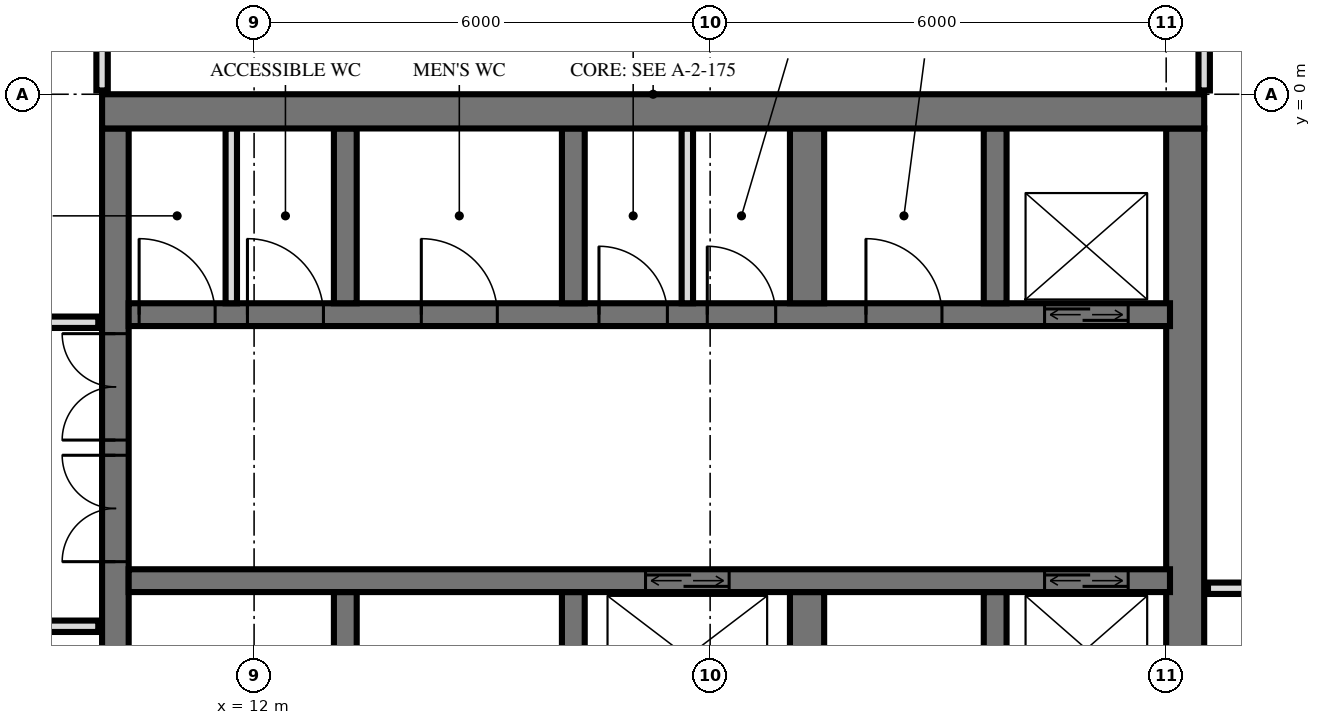
"""IFC4 building model, lengths in metres.
Left out: names, types, materials, properties, quantities, classifications, styles, units other than length and angle.
Written with IfcOpenShell. Run it as: python <this file> out.ifc"""

import sys

from ifc_helpers import new_model, si_unit, direction, frame, frame_2d, origin, place, context, subcontext, project, spatial, rectangle, extrude, element, fill, save


model = new_model("IFC4")
c1 = context("Model", 3, precision=1e-05, world=origin(), true_north=direction((0.0, 1.0)))
c2 = subcontext(c1, "Body", "Model", "MODEL_VIEW")
j1 = project(units=[si_unit("LENGTHUNIT", "METRE"), si_unit("PLANEANGLEUNIT", "RADIAN")], contexts=[c1])
p1 = place(None, origin())
s1 = spatial("IfcSite", under=j1, at=p1, CompositionType="ELEMENT")
p2 = place(p1, origin())
s2 = spatial("IfcBuilding", under=s1, at=p2, CompositionType="ELEMENT")
p3 = place(p2, frame((0.0, 0.0, 156.0)))
s3 = spatial("IfcBuildingStorey", under=s2, at=p3, CompositionType="ELEMENT", Elevation=156.0)
p4 = place(p3, frame((10.0, -0.225, 0.0), z_axis=(0.0, 0.0, 1.0), x_axis=(1.0, 0.0, 0.0)))
e1 = element("IfcWall", 1, at=p4, inside=s3, PredefinedType="SHEAR", context=c2, shape_type="SweptSolid", body=[
    extrude(rectangle(XDim=14.5, YDim=0.45, at=frame_2d((7.25, 0.0))), origin(), (0.0, 0.0, 1.0), 3.6),
])
p5 = place(p3, frame((10.175, -14.55, 0.0), z_axis=(0.0, 0.0, 1.0), x_axis=(0.0, 1.0, 0.0)))
e2 = element("IfcWall", 2, at=p5, inside=s3, PredefinedType="SHEAR", context=c2, shape_type="SweptSolid", body=[
    extrude(rectangle(XDim=14.1, YDim=0.35, at=frame_2d((7.05, 0.0))), origin(), (0.0, 0.0, 1.0), 3.6),
])
p6 = place(p5, frame((8.4, 0.0, 0.0)))
e3 = element("IfcOpeningElement", 3, at=p6, cuts=e2, PredefinedType="OPENING", context=c2, shape_type="SweptSolid", body=[
    extrude(rectangle(XDim=1.4, YDim=2.4, at=frame_2d((0.7, 1.2))), frame((0.0, 0.185, 0.0), z_axis=(0.0, -1.0, 0.0), x_axis=(1.0, 0.0, 0.0)), (0.0, 0.0, 1.0), 0.37),
])
p7 = place(p5, frame((10.0, 0.0, 0.0)))
e4 = element("IfcOpeningElement", 4, at=p7, cuts=e2, PredefinedType="OPENING", context=c2, shape_type="SweptSolid", body=[
    extrude(rectangle(XDim=1.4, YDim=2.4, at=frame_2d((0.7, 1.2))), frame((0.0, 0.185, 0.0), z_axis=(0.0, -1.0, 0.0), x_axis=(1.0, 0.0, 0.0)), (0.0, 0.0, 1.0), 0.37),
])
p8 = place(p5, frame((4.0, 0.0, 0.0)))
e5 = element("IfcOpeningElement", 5, at=p8, cuts=e2, PredefinedType="OPENING", context=c2, shape_type="SweptSolid", body=[
    extrude(rectangle(XDim=1.2, YDim=2.1, at=frame_2d((0.6, 1.05))), frame((0.0, 0.185, 0.0), z_axis=(0.0, -1.0, 0.0), x_axis=(1.0, 0.0, 0.0)), (0.0, 0.0, 1.0), 0.37),
])
p9 = place(p3, frame((24.25, -14.55, 0.0), z_axis=(0.0, 0.0, 1.0), x_axis=(0.0, 1.0, 0.0)))
e6 = element("IfcWall", 6, at=p9, inside=s3, PredefinedType="SHEAR", context=c2, shape_type="SweptSolid", body=[
    extrude(rectangle(XDim=14.1, YDim=0.5, at=frame_2d((7.05, 0.0))), origin(), (0.0, 0.0, 1.0), 3.6),
])
p10 = place(p3, frame((10.35, -2.9, 0.0), z_axis=(0.0, 0.0, 1.0), x_axis=(1.0, 0.0, 0.0)))
e7 = element("IfcWall", 7, at=p10, inside=s3, PredefinedType="SHEAR", context=c2, shape_type="SweptSolid", body=[
    extrude(rectangle(XDim=13.7, YDim=0.3, at=frame_2d((6.85, 0.0))), origin(), (0.0, 0.0, 1.0), 3.6),
])
p11 = place(p10, frame((12.05, 0.0, 0.0)))
e8 = element("IfcOpeningElement", 8, at=p11, cuts=e7, PredefinedType="OPENING", context=c2, shape_type="SweptSolid", body=[
    extrude(rectangle(XDim=1.1, YDim=2.1, at=frame_2d((0.55, 1.05))), frame((0.0, 0.16, 0.0), z_axis=(0.0, -1.0, 0.0), x_axis=(1.0, 0.0, 0.0)), (0.0, 0.0, 1.0), 0.32),
])
p12 = place(p10, frame((6.188, 0.0, 0.0)))
e9 = element("IfcOpeningElement", 9, at=p12, cuts=e7, PredefinedType="OPENING", context=c2, shape_type="SweptSolid", body=[
    extrude(rectangle(XDim=0.9, YDim=2.1, at=frame_2d((0.45, 1.05))), frame((0.0, 0.16, 0.0), z_axis=(0.0, -1.0, 0.0), x_axis=(1.0, 0.0, 0.0)), (0.0, 0.0, 1.0), 0.32),
])
p13 = place(p10, frame((7.613, 0.0, 0.0)))
e10 = element("IfcOpeningElement", 10, at=p13, cuts=e7, PredefinedType="OPENING", context=c2, shape_type="SweptSolid", body=[
    extrude(rectangle(XDim=0.9, YDim=2.1, at=frame_2d((0.45, 1.05))), frame((0.0, 0.16, 0.0), z_axis=(0.0, -1.0, 0.0), x_axis=(1.0, 0.0, 0.0)), (0.0, 0.0, 1.0), 0.32),
])
p14 = place(p10, frame((0.137, 0.0, 0.0)))
e11 = element("IfcOpeningElement", 11, at=p14, cuts=e7, PredefinedType="OPENING", context=c2, shape_type="SweptSolid", body=[
    extrude(rectangle(XDim=1.0, YDim=2.1, at=frame_2d((0.5, 1.05))), frame((0.0, 0.16, 0.0), z_axis=(0.0, -1.0, 0.0), x_axis=(1.0, 0.0, 0.0)), (0.0, 0.0, 1.0), 0.32),
])
p15 = place(p10, frame((1.562, 0.0, 0.0)))
e12 = element("IfcOpeningElement", 12, at=p15, cuts=e7, PredefinedType="OPENING", context=c2, shape_type="SweptSolid", body=[
    extrude(rectangle(XDim=1.0, YDim=2.1, at=frame_2d((0.5, 1.05))), frame((0.0, 0.16, 0.0), z_axis=(0.0, -1.0, 0.0), x_axis=(1.0, 0.0, 0.0)), (0.0, 0.0, 1.0), 0.32),
])
p16 = place(p10, frame((3.85, 0.0, 0.0)))
e13 = element("IfcOpeningElement", 13, at=p16, cuts=e7, PredefinedType="OPENING", context=c2, shape_type="SweptSolid", body=[
    extrude(rectangle(XDim=1.0, YDim=2.1, at=frame_2d((0.5, 1.05))), frame((0.0, 0.16, 0.0), z_axis=(0.0, -1.0, 0.0), x_axis=(1.0, 0.0, 0.0)), (0.0, 0.0, 1.0), 0.32),
])
p17 = place(p10, frame((9.7, 0.0, 0.0)))
e14 = element("IfcOpeningElement", 14, at=p17, cuts=e7, PredefinedType="OPENING", context=c2, shape_type="SweptSolid", body=[
    extrude(rectangle(XDim=1.0, YDim=2.1, at=frame_2d((0.5, 1.05))), frame((0.0, 0.16, 0.0), z_axis=(0.0, -1.0, 0.0), x_axis=(1.0, 0.0, 0.0)), (0.0, 0.0, 1.0), 0.32),
])
p18 = place(p3, frame((10.35, -6.4, 0.0), z_axis=(0.0, 0.0, 1.0), x_axis=(1.0, 0.0, 0.0)))
e15 = element("IfcWall", 15, at=p18, inside=s3, PredefinedType="SHEAR", context=c2, shape_type="SweptSolid", body=[
    extrude(rectangle(XDim=13.7, YDim=0.3, at=frame_2d((6.85, 0.0))), origin(), (0.0, 0.0, 1.0), 3.6),
])
p19 = place(p18, frame((12.05, 0.0, 0.0)))
e16 = element("IfcOpeningElement", 16, at=p19, cuts=e15, PredefinedType="OPENING", context=c2, shape_type="SweptSolid", body=[
    extrude(rectangle(XDim=1.1, YDim=2.1, at=frame_2d((0.55, 1.05))), frame((0.0, 0.16, 0.0), z_axis=(0.0, -1.0, 0.0), x_axis=(1.0, 0.0, 0.0)), (0.0, 0.0, 1.0), 0.32),
])
p20 = place(p18, frame((6.8, 0.0, 0.0)))
e17 = element("IfcOpeningElement", 17, at=p20, cuts=e15, PredefinedType="OPENING", context=c2, shape_type="SweptSolid", body=[
    extrude(rectangle(XDim=1.1, YDim=2.1, at=frame_2d((0.55, 1.05))), frame((0.0, 0.16, 0.0), z_axis=(0.0, -1.0, 0.0), x_axis=(1.0, 0.0, 0.0)), (0.0, 0.0, 1.0), 0.32),
])
for number, where, z_axis, x_axis in (
    (18, (13.2, -2.75, 0.0), (0.0, 0.0, 1.0), (0.0, 1.0, 0.0)),
    (19, (13.2, -8.85, 0.0), (0.0, 0.0, 1.0), (0.0, 1.0, 0.0)),
    (20, (16.2, -2.75, 0.0), (0.0, 0.0, 1.0), (0.0, 1.0, 0.0)),
    (21, (16.2, -8.85, 0.0), (0.0, 0.0, 1.0), (0.0, 1.0, 0.0)),
):
    element("IfcWall", number, at=place(p3, frame(where, z_axis=z_axis, x_axis=x_axis)), inside=s3, PredefinedType="SHEAR", context=c2, shape_type="SweptSolid", body=[
        extrude(rectangle(XDim=2.3, YDim=0.3, at=frame_2d((1.15, 0.0))), origin(), (0.0, 0.0, 1.0), 3.6),
    ])
for number, where, z_axis, x_axis in (
    (22, (19.275, -2.75, 0.0), (0.0, 0.0, 1.0), (0.0, 1.0, 0.0)),
    (23, (19.275, -8.85, 0.0), (0.0, 0.0, 1.0), (0.0, 1.0, 0.0)),
):
    element("IfcWall", number, at=place(p3, frame(where, z_axis=z_axis, x_axis=x_axis)), inside=s3, PredefinedType="SHEAR", context=c2, shape_type="SweptSolid", body=[
        extrude(rectangle(XDim=2.3, YDim=0.45, at=frame_2d((1.15, 0.0))), origin(), (0.0, 0.0, 1.0), 3.6),
    ])
for number, where, z_axis, x_axis in (
    (24, (21.75, -2.75, 0.0), (0.0, 0.0, 1.0), (0.0, 1.0, 0.0)),
    (25, (21.75, -8.85, 0.0), (0.0, 0.0, 1.0), (0.0, 1.0, 0.0)),
):
    element("IfcWall", number, at=place(p3, frame(where, z_axis=z_axis, x_axis=x_axis)), inside=s3, PredefinedType="SHEAR", context=c2, shape_type="SweptSolid", body=[
        extrude(rectangle(XDim=2.3, YDim=0.3, at=frame_2d((1.15, 0.0))), origin(), (0.0, 0.0, 1.0), 3.6),
    ])
for number, where, z_axis, x_axis in (
    (26, (17.7, -2.75, 0.0), (0.0, 0.0, 1.0), (0.0, 1.0, 0.0)),
    (27, (11.7, -2.75, 0.0), (0.0, 0.0, 1.0), (0.0, 1.0, 0.0)),
):
    element("IfcWall", number, at=place(p3, frame(where, z_axis=z_axis, x_axis=x_axis)), inside=s3, PredefinedType="PARTITIONING", context=c2, shape_type="SweptSolid", body=[
        extrude(rectangle(XDim=2.3, YDim=0.15, at=frame_2d((1.15, 0.0))), origin(), (0.0, 0.0, 1.0), 3.3),
    ])
p21 = place(p3, frame((24.5, 0.05, 0.0), z_axis=(0.0, 0.0, 1.0), x_axis=(0.0, 1.0, 0.0)))
e28 = element("IfcWall", 28, at=p21, inside=s3, PredefinedType="PARTITIONING", context=c2, shape_type="SweptSolid", body=[
    extrude(rectangle(XDim=0.807, YDim=0.15, at=frame_2d((0.404, 0.0))), origin(), (0.0, 0.0, 1.0), 3.32),
])
p22 = place(p3, frame((10.0, 0.05, 0.0), z_axis=(0.0, 0.0, 1.0), x_axis=(0.0, 1.0, 0.0)))
e29 = element("IfcWall", 29, at=p22, inside=s3, PredefinedType="PARTITIONING", context=c2, shape_type="SweptSolid", body=[
    extrude(rectangle(XDim=0.97, YDim=0.15, at=frame_2d((0.485, 0.0))), origin(), (0.0, 0.0, 1.0), 3.32),
])
p23 = place(p3, frame((-9.95, -7.0, 0.0), z_axis=(0.0, 0.0, 1.0), x_axis=(1.0, 0.0, 0.0)))
e30 = element("IfcWall", 30, at=p23, inside=s3, PredefinedType="PARTITIONING", context=c2, shape_type="SweptSolid", body=[
    extrude(rectangle(XDim=19.9, YDim=0.15, at=frame_2d((9.95, 0.0))), origin(), (0.0, 0.0, 1.0), 3.32),
])
p24 = place(p23, frame((9.45, 0.0, 0.0)))
e31 = element("IfcOpeningElement", 31, at=p24, cuts=e30, PredefinedType="OPENING", context=c2, shape_type="SweptSolid", body=[
    extrude(rectangle(XDim=1.0, YDim=2.1, at=frame_2d((0.5, 1.05))), frame((0.0, 0.085, 0.0), z_axis=(0.0, -1.0, 0.0), x_axis=(1.0, 0.0, 0.0)), (0.0, 0.0, 1.0), 0.17),
])
p25 = place(p23, frame((3.45, 0.0, 0.0)))
e32 = element("IfcOpeningElement", 32, at=p25, cuts=e30, PredefinedType="OPENING", context=c2, shape_type="SweptSolid", body=[
    extrude(rectangle(XDim=1.0, YDim=2.1, at=frame_2d((0.5, 1.05))), frame((0.0, 0.085, 0.0), z_axis=(0.0, -1.0, 0.0), x_axis=(1.0, 0.0, 0.0)), (0.0, 0.0, 1.0), 0.17),
])
p26 = place(p3, frame((24.55, -6.5, 0.0), z_axis=(0.0, 0.0, 1.0), x_axis=(1.0, 0.0, 0.0)))
e33 = element("IfcWall", 33, at=p26, inside=s3, PredefinedType="PARTITIONING", context=c2, shape_type="SweptSolid", body=[
    extrude(rectangle(XDim=3.47, YDim=0.15, at=frame_2d((1.735, 0.0))), origin(), (0.0, 0.0, 1.0), 3.32),
])
p27 = place(p26, frame((1.35, 0.0, 0.0)))
e34 = element("IfcOpeningElement", 34, at=p27, cuts=e33, PredefinedType="OPENING", context=c2, shape_type="SweptSolid", body=[
    extrude(rectangle(XDim=0.9, YDim=2.1, at=frame_2d((0.45, 1.05))), frame((0.0, 0.085, 0.0), z_axis=(0.0, -1.0, 0.0), x_axis=(1.0, 0.0, 0.0)), (0.0, 0.0, 1.0), 0.17),
])
p28 = place(p3, frame((-9.95, -3.0, 0.0), z_axis=(0.0, 0.0, 1.0), x_axis=(1.0, 0.0, 0.0)))
e35 = element("IfcWall", 35, at=p28, inside=s3, PredefinedType="PARTITIONING", context=c2, shape_type="SweptSolid", body=[
    extrude(rectangle(XDim=19.9, YDim=0.15, at=frame_2d((9.95, 0.0))), origin(), (0.0, 0.0, 1.0), 3.32),
])
p29 = place(p28, frame((1.45, 0.0, 0.0)))
e36 = element("IfcOpeningElement", 36, at=p29, cuts=e35, PredefinedType="OPENING", context=c2, shape_type="SweptSolid", body=[
    extrude(rectangle(XDim=1.0, YDim=2.1, at=frame_2d((0.5, 1.05))), frame((0.0, 0.085, 0.0), z_axis=(0.0, -1.0, 0.0), x_axis=(1.0, 0.0, 0.0)), (0.0, 0.0, 1.0), 0.17),
])
p30 = place(p28, frame((4.95, 0.0, 0.0)))
e37 = element("IfcOpeningElement", 37, at=p30, cuts=e35, PredefinedType="OPENING", context=c2, shape_type="SweptSolid", body=[
    extrude(rectangle(XDim=1.0, YDim=2.1, at=frame_2d((0.5, 1.05))), frame((0.0, 0.085, 0.0), z_axis=(0.0, -1.0, 0.0), x_axis=(1.0, 0.0, 0.0)), (0.0, 0.0, 1.0), 0.17),
])
p31 = place(p28, frame((7.7, 0.0, 0.0)))
e38 = element("IfcOpeningElement", 38, at=p31, cuts=e35, PredefinedType="OPENING", context=c2, shape_type="SweptSolid", body=[
    extrude(rectangle(XDim=1.0, YDim=2.1, at=frame_2d((0.5, 1.05))), frame((0.0, 0.085, 0.0), z_axis=(0.0, -1.0, 0.0), x_axis=(1.0, 0.0, 0.0)), (0.0, 0.0, 1.0), 0.17),
])
p32 = place(p28, frame((14.2, 0.0, 0.0)))
e39 = element("IfcOpeningElement", 39, at=p32, cuts=e35, PredefinedType="OPENING", context=c2, shape_type="SweptSolid", body=[
    extrude(rectangle(XDim=1.0, YDim=2.1, at=frame_2d((0.5, 1.05))), frame((0.0, 0.085, 0.0), z_axis=(0.0, -1.0, 0.0), x_axis=(1.0, 0.0, 0.0)), (0.0, 0.0, 1.0), 0.17),
])
p33 = place(p11, origin())
e40 = element("IfcDoor", 40, at=p33, inside=s3, OperationType="DOUBLE_DOOR_SLIDING", PredefinedType="USERDEFINED", context=c2, shape_type="SweptSolid", body=[
    extrude(rectangle(XDim=1.1, YDim=2.1, at=frame_2d((0.55, 1.05))), frame((0.0, 0.025, 0.0), z_axis=(0.0, -1.0, 0.0), x_axis=(1.0, 0.0, 0.0)), (0.0, 0.0, 1.0), 0.05),
])
fill(e8, e40)
p34 = place(p19, origin())
e41 = element("IfcDoor", 41, at=p34, inside=s3, OperationType="DOUBLE_DOOR_SLIDING", PredefinedType="USERDEFINED", context=c2, shape_type="SweptSolid", body=[
    extrude(rectangle(XDim=1.1, YDim=2.1, at=frame_2d((0.55, 1.05))), frame((0.0, 0.025, 0.0), z_axis=(0.0, -1.0, 0.0), x_axis=(1.0, 0.0, 0.0)), (0.0, 0.0, 1.0), 0.05),
])
fill(e16, e41)
p35 = place(p20, origin())
e42 = element("IfcDoor", 42, at=p35, inside=s3, OperationType="DOUBLE_DOOR_SLIDING", PredefinedType="USERDEFINED", context=c2, shape_type="SweptSolid", body=[
    extrude(rectangle(XDim=1.1, YDim=2.1, at=frame_2d((0.55, 1.05))), frame((0.0, 0.025, 0.0), z_axis=(0.0, -1.0, 0.0), x_axis=(1.0, 0.0, 0.0)), (0.0, 0.0, 1.0), 0.05),
])
fill(e17, e42)
p36 = place(p6, origin())
e43 = element("IfcDoor", 43, at=p36, inside=s3, OperationType="DOUBLE_DOOR_SINGLE_SWING", PredefinedType="DOOR", context=c2, shape_type="SweptSolid", body=[
    extrude(rectangle(XDim=1.4, YDim=2.4, at=frame_2d((0.7, 1.2))), frame((0.0, 0.025, 0.0), z_axis=(0.0, -1.0, 0.0), x_axis=(1.0, 0.0, 0.0)), (0.0, 0.0, 1.0), 0.05),
])
fill(e3, e43)
p37 = place(p7, origin())
e44 = element("IfcDoor", 44, at=p37, inside=s3, OperationType="DOUBLE_DOOR_SINGLE_SWING", PredefinedType="DOOR", context=c2, shape_type="SweptSolid", body=[
    extrude(rectangle(XDim=1.4, YDim=2.4, at=frame_2d((0.7, 1.2))), frame((0.0, 0.025, 0.0), z_axis=(0.0, -1.0, 0.0), x_axis=(1.0, 0.0, 0.0)), (0.0, 0.0, 1.0), 0.05),
])
fill(e4, e44)
p38 = place(p12, origin())
e45 = element("IfcDoor", 45, at=p38, inside=s3, OperationType="SINGLE_SWING_RIGHT", PredefinedType="DOOR", context=c2, shape_type="SweptSolid", body=[
    extrude(rectangle(XDim=0.9, YDim=2.1, at=frame_2d((0.45, 1.05))), frame((0.0, 0.025, 0.0), z_axis=(0.0, -1.0, 0.0), x_axis=(1.0, 0.0, 0.0)), (0.0, 0.0, 1.0), 0.05),
])
fill(e9, e45)
p39 = place(p13, origin())
e46 = element("IfcDoor", 46, at=p39, inside=s3, OperationType="SINGLE_SWING_RIGHT", PredefinedType="DOOR", context=c2, shape_type="SweptSolid", body=[
    extrude(rectangle(XDim=0.9, YDim=2.1, at=frame_2d((0.45, 1.05))), frame((0.0, 0.025, 0.0), z_axis=(0.0, -1.0, 0.0), x_axis=(1.0, 0.0, 0.0)), (0.0, 0.0, 1.0), 0.05),
])
fill(e10, e46)
p40 = place(p14, origin())
e47 = element("IfcDoor", 47, at=p40, inside=s3, OperationType="SINGLE_SWING_RIGHT", PredefinedType="DOOR", context=c2, shape_type="SweptSolid", body=[
    extrude(rectangle(XDim=1.0, YDim=2.1, at=frame_2d((0.5, 1.05))), frame((0.0, 0.025, 0.0), z_axis=(0.0, -1.0, 0.0), x_axis=(1.0, 0.0, 0.0)), (0.0, 0.0, 1.0), 0.05),
])
fill(e11, e47)
p41 = place(p15, origin())
e48 = element("IfcDoor", 48, at=p41, inside=s3, OperationType="SINGLE_SWING_RIGHT", PredefinedType="DOOR", context=c2, shape_type="SweptSolid", body=[
    extrude(rectangle(XDim=1.0, YDim=2.1, at=frame_2d((0.5, 1.05))), frame((0.0, 0.025, 0.0), z_axis=(0.0, -1.0, 0.0), x_axis=(1.0, 0.0, 0.0)), (0.0, 0.0, 1.0), 0.05),
])
fill(e12, e48)
p42 = place(p16, origin())
e49 = element("IfcDoor", 49, at=p42, inside=s3, OperationType="SINGLE_SWING_RIGHT", PredefinedType="DOOR", context=c2, shape_type="SweptSolid", body=[
    extrude(rectangle(XDim=1.0, YDim=2.1, at=frame_2d((0.5, 1.05))), frame((0.0, 0.025, 0.0), z_axis=(0.0, -1.0, 0.0), x_axis=(1.0, 0.0, 0.0)), (0.0, 0.0, 1.0), 0.05),
])
fill(e13, e49)
p43 = place(p17, origin())
e50 = element("IfcDoor", 50, at=p43, inside=s3, OperationType="SINGLE_SWING_RIGHT", PredefinedType="DOOR", context=c2, shape_type="SweptSolid", body=[
    extrude(rectangle(XDim=1.0, YDim=2.1, at=frame_2d((0.5, 1.05))), frame((0.0, 0.025, 0.0), z_axis=(0.0, -1.0, 0.0), x_axis=(1.0, 0.0, 0.0)), (0.0, 0.0, 1.0), 0.05),
])
fill(e14, e50)
save(model, sys.argv[1])
